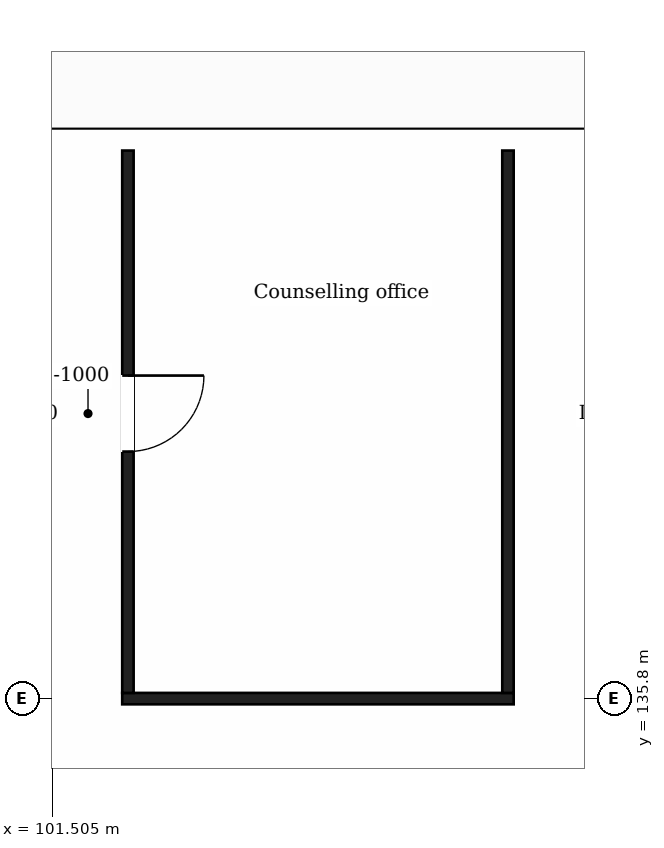
"""IFC4 building model, lengths in metres.
Left out: names, types, materials, properties, quantities, classifications, styles, units other than length and angle.
Written with IfcOpenShell. Run it as: python <this file> out.ifc"""

import sys

from ifc_helpers import new_model, si_unit, direction, frame, frame_2d, origin, place, context, subcontext, project, spatial, rectangle, extrude, element, fill, save


model = new_model("IFC4")
c1 = context("Model", 3, precision=1e-05, world=origin(), true_north=direction((0.0, 1.0)))
c2 = subcontext(c1, "Body", "Model", "MODEL_VIEW")
j1 = project(units=[si_unit("LENGTHUNIT", "METRE"), si_unit("PLANEANGLEUNIT", "RADIAN")], contexts=[c1])
p1 = place(None, origin())
s1 = spatial("IfcSite", under=j1, at=p1, CompositionType="ELEMENT")
p2 = place(p1, origin())
s2 = spatial("IfcBuilding", under=s1, at=p2, CompositionType="ELEMENT")
p3 = place(p2, frame((0.0, 0.0, 135.4)))
s3 = spatial("IfcBuildingStorey", under=s2, at=p3, CompositionType="ELEMENT", Elevation=135.4)
p4 = place(p3, frame((102.425, 135.8, 0.0), z_axis=(0.0, 0.0, 1.0), x_axis=(1.0, 0.0, 0.0)))
e1 = element("IfcWall", 1, at=p4, inside=s3, PredefinedType="PARTITIONING", context=c2, shape_type="SweptSolid", body=[
    extrude(rectangle(XDim=5.15, YDim=0.15, at=frame_2d((2.575, 0.0))), origin(), (0.0, 0.0, 1.0), 6.9),
])
p5 = place(p3, frame((102.5, 135.875, 0.0), z_axis=(0.0, 0.0, 1.0), x_axis=(0.0, 1.0, 0.0)))
e2 = element("IfcWall", 2, at=p5, inside=s3, PredefinedType="PARTITIONING", context=c2, shape_type="SweptSolid", body=[
    extrude(rectangle(XDim=7.135, YDim=0.15, at=frame_2d((3.567, 0.0))), origin(), (0.0, 0.0, 1.0), 6.9),
])
p6 = place(p5, frame((3.175, 0.0, 0.0)))
e3 = element("IfcOpeningElement", 3, at=p6, cuts=e2, PredefinedType="OPENING", context=c2, shape_type="SweptSolid", body=[
    extrude(rectangle(XDim=1.0, YDim=2.1, at=frame_2d((0.5, 1.05))), frame((0.0, 0.085, 0.0), z_axis=(0.0, -1.0, 0.0), x_axis=(1.0, 0.0, 0.0)), (0.0, 0.0, 1.0), 0.17),
])
p7 = place(p3, frame((107.5, 135.875, 0.0), z_axis=(0.0, 0.0, 1.0), x_axis=(0.0, 1.0, 0.0)))
e4 = element("IfcWall", 4, at=p7, inside=s3, PredefinedType="PARTITIONING", context=c2, shape_type="SweptSolid", body=[
    extrude(rectangle(XDim=7.135, YDim=0.15, at=frame_2d((3.567, 0.0))), origin(), (0.0, 0.0, 1.0), 6.9),
])
p8 = place(p6, origin())
e5 = element("IfcDoor", 5, at=p8, inside=s3, OperationType="SINGLE_SWING_RIGHT", PredefinedType="DOOR", context=c2, shape_type="SweptSolid", body=[
    extrude(rectangle(XDim=1.0, YDim=2.1, at=frame_2d((0.5, 1.05))), frame((0.0, 0.025, 0.0), z_axis=(0.0, -1.0, 0.0), x_axis=(1.0, 0.0, 0.0)), (0.0, 0.0, 1.0), 0.05),
])
fill(e3, e5)
save(model, sys.argv[1])
